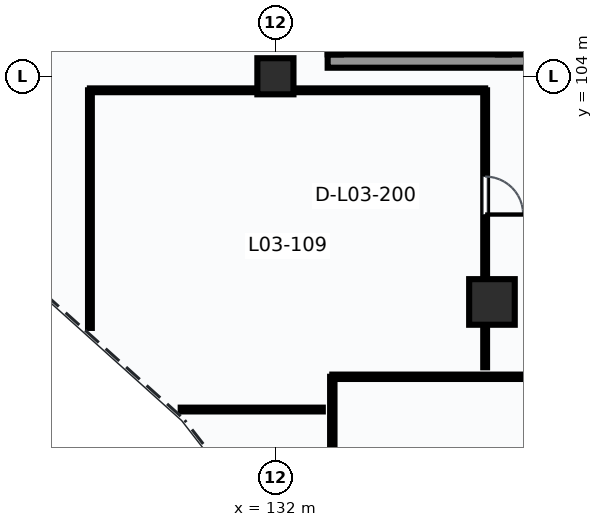
"""IFC4 building model, lengths in metres.
Left out: names, types, materials, properties, quantities, classifications, styles, units other than length and angle.
Written with IfcOpenShell. Run it as: python <this file> out.ifc"""

import sys

from ifc_helpers import new_model, si_unit, direction, frame, frame_2d, origin, origin_2d, place, context, subcontext, project, spatial, rectangle, extrude, element, fill, save


model = new_model("IFC4")
c1 = context("Model", 3, precision=1e-05, world=origin(), true_north=direction((0.0, 1.0)))
c2 = subcontext(c1, "Body", "Model", "MODEL_VIEW")
j1 = project(units=[si_unit("LENGTHUNIT", "METRE"), si_unit("PLANEANGLEUNIT", "RADIAN")], contexts=[c1])
p1 = place(None, origin())
s1 = spatial("IfcSite", under=j1, at=p1, CompositionType="ELEMENT")
p2 = place(p1, origin())
s2 = spatial("IfcBuilding", under=s1, at=p2, CompositionType="ELEMENT")
p3 = place(p2, frame((0.0, 0.0, 14.7)))
s3 = spatial("IfcBuildingStorey", under=s2, at=p3, CompositionType="ELEMENT", Elevation=14.7)
p4 = place(p3, frame((132.0, 104.0, 0.0), z_axis=(0.0, 0.0, 1.0), x_axis=(1.0, 0.0, 0.0)))
e1 = element("IfcColumn", 1, at=p4, inside=s3, PredefinedType="COLUMN", context=c2, shape_type="SweptSolid", body=[
    extrude(rectangle(XDim=0.95, YDim=0.95, at=origin_2d()), origin(), (0.0, 0.0, 1.0), 4.5),
])
p5 = place(p3, frame((137.698, 98.062, 0.0), z_axis=(0.0, 0.0, 1.0), x_axis=(1.0, 0.0, 0.0)))
e2 = element("IfcColumn", 2, at=p5, inside=s3, PredefinedType="COLUMN", context=c2, shape_type="SweptSolid", body=[
    extrude(rectangle(XDim=1.2, YDim=1.2, at=origin_2d()), origin(), (0.0, 0.0, 1.0), 4.5),
])
p6 = place(p3, frame((133.375, 104.4, 0.0), z_axis=(0.0, 0.0, 1.0), x_axis=(1.0, 0.0, 0.0)))
e3 = element("IfcWall", 3, at=p6, inside=s3, PredefinedType="SHEAR", context=c2, shape_type="SweptSolid", body=[
    extrude(rectangle(XDim=9.25, YDim=0.35, at=frame_2d((4.625, 0.0))), origin(), (0.0, 0.0, 1.0), 4.5),
])
p7 = place(p3, frame((133.55, 104.575, 0.0), z_axis=(0.0, 0.0, 1.0), x_axis=(0.0, 1.0, 0.0)))
e4 = element("IfcWall", 4, at=p7, inside=s3, PredefinedType="SHEAR", context=c2, shape_type="SweptSolid", body=[
    extrude(rectangle(XDim=9.25, YDim=0.35, at=frame_2d((4.625, 0.0))), origin(), (0.0, 0.0, 1.0), 4.5),
])
p8 = place(p7, frame((7.425, 0.0, 0.0)))
e5 = element("IfcOpeningElement", 5, at=p8, cuts=e4, PredefinedType="OPENING", context=c2, shape_type="SweptSolid", body=[
    extrude(rectangle(XDim=1.4, YDim=2.2, at=frame_2d((0.7, 1.1))), frame((0.0, 0.185, 0.0), z_axis=(0.0, -1.0, 0.0), x_axis=(1.0, 0.0, 0.0)), (0.0, 0.0, 1.0), 0.37),
])
p9 = place(p3, frame((138.0, 104.575, 0.0), z_axis=(0.0, 0.0, 1.0), x_axis=(0.0, 1.0, 0.0)))
e6 = element("IfcWall", 6, at=p9, inside=s3, PredefinedType="SHEAR", context=c2, shape_type="SweptSolid", body=[
    extrude(rectangle(XDim=9.25, YDim=0.29, at=frame_2d((4.625, 0.0))), origin(), (0.0, 0.0, 1.0), 4.5),
])
p10 = place(p3, frame((133.497, 90.177, 0.0), z_axis=(0.0, 0.0, 1.0), x_axis=(0.0, 1.0, 0.0)))
e7 = element("IfcWall", 7, at=p10, inside=s3, PredefinedType="PARTITIONING", context=c2, shape_type="SweptSolid", body=[
    extrude(rectangle(XDim=5.916, YDim=0.115, at=frame_2d((2.958, 0.0))), origin(), (0.0, 0.0, 1.0), 4.16),
])
p11 = place(p3, frame((133.497, 96.093, 0.0), z_axis=(0.0, 0.0, 1.0), x_axis=(1.0, 0.0, 0.0)))
e8 = element("IfcWall", 8, at=p11, inside=s3, PredefinedType="PARTITIONING", context=c2, shape_type="SweptSolid", body=[
    extrude(rectangle(XDim=10.4, YDim=0.115, at=frame_2d((5.2, 0.0))), origin(), (0.0, 0.0, 1.0), 2.603),
])
p12 = place(p11, frame((5.598, 0.0, 0.0)))
e9 = element("IfcOpeningElement", 9, at=p12, cuts=e8, PredefinedType="OPENING", context=c2, shape_type="SweptSolid", body=[
    extrude(rectangle(XDim=1.7, YDim=2.3, at=frame_2d((0.85, 1.15))), frame((0.0, 0.067, 0.0), z_axis=(0.0, -1.0, 0.0), x_axis=(1.0, 0.0, 0.0)), (0.0, 0.0, 1.0), 0.135),
])
p13 = place(p3, frame((137.519, 103.631, 0.0), z_axis=(0.0, 0.0, 1.0), x_axis=(0.0, -1.0, 0.0)))
e10 = element("IfcWall", 10, at=p13, inside=s3, PredefinedType="PARTITIONING", context=c2, shape_type="SweptSolid", body=[
    extrude(rectangle(XDim=7.288, YDim=0.1, at=frame_2d((3.644, 0.0))), origin(), (0.0, 0.0, 1.0), 4.16),
])
p14 = place(p13, frame((2.269, 0.0, 0.0)))
e11 = element("IfcOpeningElement", 11, at=p14, cuts=e10, PredefinedType="OPENING", context=c2, shape_type="SweptSolid", body=[
    extrude(rectangle(XDim=1.0, YDim=2.2, at=frame_2d((0.5, 1.1))), frame((0.0, 0.06, 0.0), z_axis=(0.0, -1.0, 0.0), x_axis=(1.0, 0.0, 0.0)), (0.0, 0.0, 1.0), 0.12),
])
p15 = place(p3, frame((133.247, 95.231, 0.0), z_axis=(0.0, 0.0, 1.0), x_axis=(-1.0, 0.0, 0.0)))
e12 = element("IfcWall", 12, at=p15, inside=s3, PredefinedType="PARTITIONING", context=c2, shape_type="SweptSolid", body=[
    extrude(rectangle(XDim=3.739, YDim=0.1, at=frame_2d((1.87, 0.0))), origin(), (0.0, 0.0, 1.0), 4.16),
])
p16 = place(p3, frame((127.119, 97.379, 0.0), z_axis=(0.0, 0.0, 1.0), x_axis=(0.0, 1.0, 0.0)))
e13 = element("IfcWall", 13, at=p16, inside=s3, PredefinedType="PARTITIONING", context=c2, shape_type="SweptSolid", body=[
    extrude(rectangle(XDim=6.252, YDim=0.1, at=frame_2d((3.126, 0.0))), origin(), (0.0, 0.0, 1.0), 4.16),
])
p17 = place(p3, frame((127.119, 103.631, 0.0), z_axis=(0.0, 0.0, 1.0), x_axis=(1.0, 0.0, 0.0)))
e14 = element("IfcWall", 14, at=p17, inside=s3, PredefinedType="PARTITIONING", context=c2, shape_type="SweptSolid", body=[
    extrude(rectangle(XDim=10.4, YDim=0.1, at=frame_2d((5.2, 0.0))), origin(), (0.0, 0.0, 1.0), 2.603),
])
p18 = place(p14, origin())
e15 = element("IfcDoor", 15, at=p18, inside=s3, OperationType="SINGLE_SWING_RIGHT", PredefinedType="DOOR", context=c2, shape_type="SweptSolid", body=[
    extrude(rectangle(XDim=1.0, YDim=2.2, at=frame_2d((0.5, 1.1))), frame((0.0, 0.025, 0.0), z_axis=(0.0, -1.0, 0.0), x_axis=(1.0, 0.0, 0.0)), (0.0, 0.0, 1.0), 0.05),
])
fill(e11, e15)
save(model, sys.argv[1])
